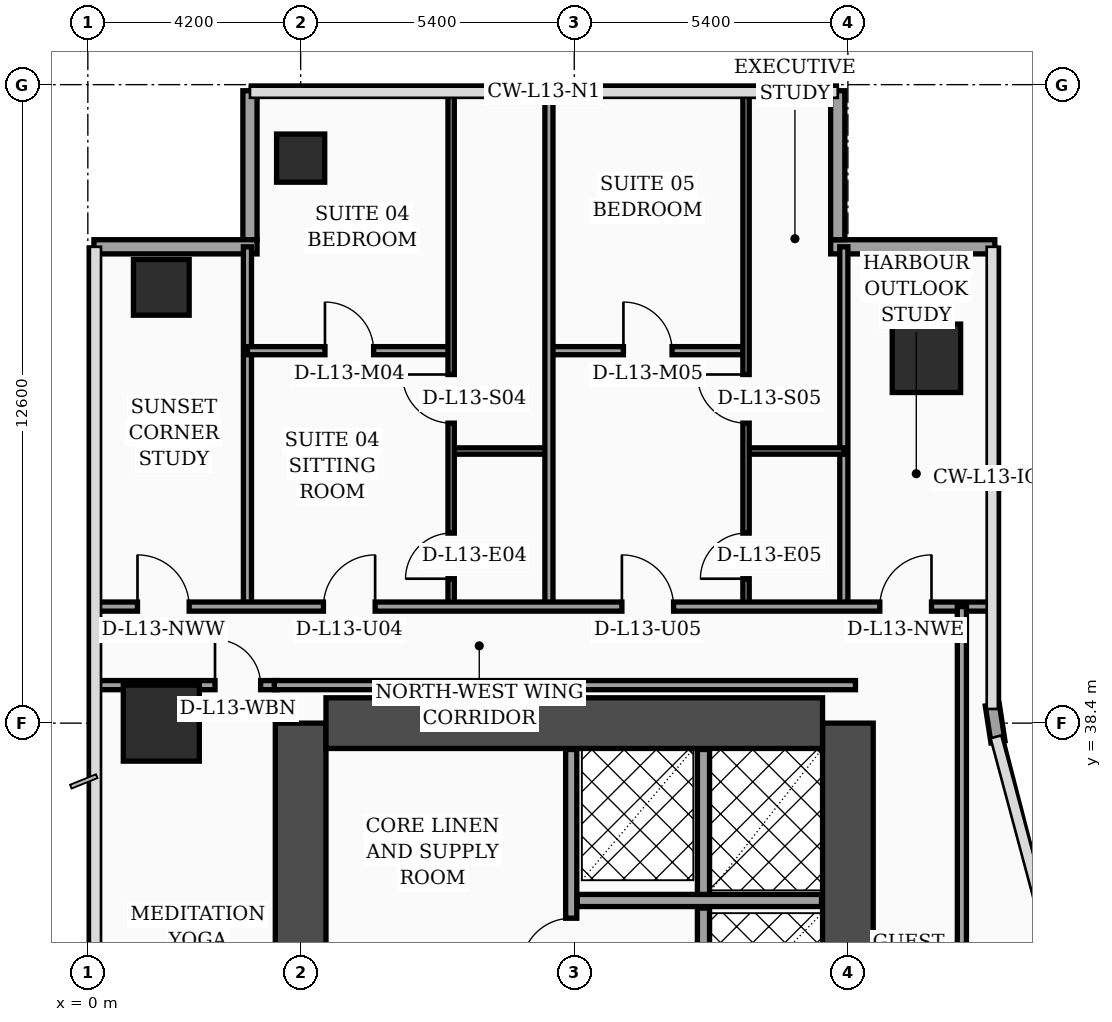
"""IFC4 building model, lengths in metres.
Left out: names, types, materials, properties, quantities, classifications, styles, units other than length and angle.
Written with IfcOpenShell. Run it as: python <this file> out.ifc"""

import sys

from ifc_helpers import new_model, si_unit, direction, frame, frame_2d, origin, origin_2d, place, context, subcontext, project, spatial, rectangle, hollow_rectangle, extrude, element, fill, save


model = new_model("IFC4")
c1 = context("Model", 3, precision=1e-05, world=origin(), true_north=direction((0.0, 1.0)))
c2 = subcontext(c1, "Body", "Model", "MODEL_VIEW")
j1 = project(units=[si_unit("LENGTHUNIT", "METRE"), si_unit("PLANEANGLEUNIT", "RADIAN")], contexts=[c1])
p1 = place(None, origin())
s1 = spatial("IfcSite", under=j1, at=p1, CompositionType="ELEMENT")
p2 = place(p1, origin())
s2 = spatial("IfcBuilding", under=s1, at=p2, CompositionType="ELEMENT")
p3 = place(p2, frame((0.0, 0.0, 58.4)))
s3 = spatial("IfcBuildingStorey", under=s2, at=p3, CompositionType="ELEMENT", Elevation=58.4)
p4 = place(p3, frame((4.2, 16.8, 0.0), z_axis=(0.0, 0.0, 1.0), x_axis=(0.0, 1.0, 0.0)))
e1 = element("IfcWall", 1, at=p4, inside=s3, PredefinedType="SHEAR", context=c2, shape_type="SweptSolid", body=[
    extrude(rectangle(XDim=21.6, YDim=1.0, at=frame_2d((10.8, 0.0))), origin(), (0.0, 0.0, 1.0), 3.56),
])
p5 = place(p3, frame((15.0, 16.8, 0.0), z_axis=(0.0, 0.0, 1.0), x_axis=(0.0, 1.0, 0.0)))
e2 = element("IfcWall", 2, at=p5, inside=s3, PredefinedType="SHEAR", context=c2, shape_type="SweptSolid", body=[
    extrude(rectangle(XDim=21.6, YDim=1.0, at=frame_2d((10.8, 0.0))), origin(), (0.0, 0.0, 1.0), 3.56),
])
p6 = place(p5, frame((8.65, 0.0, 0.0)))
e3 = element("IfcOpeningElement", 3, at=p6, cuts=e2, PredefinedType="OPENING", context=c2, shape_type="SweptSolid", body=[
    extrude(rectangle(XDim=1.1, YDim=2.2, at=frame_2d((0.55, 1.1))), frame((0.0, 0.51, 0.0), z_axis=(0.0, -1.0, 0.0), x_axis=(1.0, 0.0, 0.0)), (0.0, 0.0, 1.0), 1.02),
])
p7 = place(p5, frame((1.25, 0.0, 0.0)))
e4 = element("IfcOpeningElement", 4, at=p7, cuts=e2, PredefinedType="OPENING", context=c2, shape_type="SweptSolid", body=[
    extrude(rectangle(XDim=1.1, YDim=2.2, at=frame_2d((0.55, 1.1))), frame((0.0, 0.51, 0.0), z_axis=(0.0, -1.0, 0.0), x_axis=(1.0, 0.0, 0.0)), (0.0, 0.0, 1.0), 1.02),
])
p8 = place(p5, frame((3.8, 0.0, 0.0)))
e5 = element("IfcOpeningElement", 5, at=p8, cuts=e2, PredefinedType="OPENING", context=c2, shape_type="SweptSolid", body=[
    extrude(rectangle(XDim=1.1, YDim=2.2, at=frame_2d((0.55, 1.1))), frame((0.0, 0.51, 0.0), z_axis=(0.0, -1.0, 0.0), x_axis=(1.0, 0.0, 0.0)), (0.0, 0.0, 1.0), 1.02),
])
p9 = place(p5, frame((6.35, 0.0, 0.0)))
e6 = element("IfcOpeningElement", 6, at=p9, cuts=e2, PredefinedType="OPENING", context=c2, shape_type="SweptSolid", body=[
    extrude(rectangle(XDim=1.1, YDim=2.2, at=frame_2d((0.55, 1.1))), frame((0.0, 0.51, 0.0), z_axis=(0.0, -1.0, 0.0), x_axis=(1.0, 0.0, 0.0)), (0.0, 0.0, 1.0), 1.02),
])
p10 = place(p3, frame((4.7, 38.4, 0.0), z_axis=(0.0, 0.0, 1.0), x_axis=(1.0, 0.0, 0.0)))
e7 = element("IfcWall", 7, at=p10, inside=s3, PredefinedType="SHEAR", context=c2, shape_type="SweptSolid", body=[
    extrude(rectangle(XDim=9.8, YDim=1.0, at=frame_2d((4.9, 0.0))), origin(), (0.0, 0.0, 1.0), 3.56),
])
p11 = place(p3, frame((1.45, 38.4, 0.0), z_axis=(0.0, 0.0, 1.0), x_axis=(1.0, 0.0, 0.0)))
e8 = element("IfcColumn", 8, at=p11, inside=s3, PredefinedType="COLUMN", context=c2, shape_type="SweptSolid", body=[
    extrude(rectangle(XDim=1.5, YDim=1.5, at=origin_2d()), origin(), (0.0, 0.0, 1.0), 3.56),
])
p12 = place(p3, frame((1.45, 47.0, 0.0), z_axis=(0.0, 0.0, 1.0), x_axis=(1.0, 0.0, 0.0)))
e9 = element("IfcColumn", 9, at=p12, inside=s3, PredefinedType="COLUMN", context=c2, shape_type="SweptSolid", body=[
    extrude(hollow_rectangle(XDim=1.1, YDim=1.1, WallThickness=0.045, at=origin_2d()), origin(), (0.0, 0.0, 1.0), 3.56),
])
p13 = place(p3, frame((4.2, 49.55, 0.0), z_axis=(0.0, 0.0, 1.0), x_axis=(1.0, 0.0, 0.0)))
e10 = element("IfcColumn", 10, at=p13, inside=s3, PredefinedType="COLUMN", context=c2, shape_type="SweptSolid", body=[
    extrude(hollow_rectangle(XDim=0.95, YDim=0.95, WallThickness=0.04, at=origin_2d()), origin(), (0.0, 0.0, 1.0), 3.56),
])
p14 = place(p3, frame((16.55, 45.6, 0.0), z_axis=(0.0, 0.0, 1.0), x_axis=(1.0, 0.0, 0.0)))
e11 = element("IfcColumn", 11, at=p14, inside=s3, PredefinedType="COLUMN", context=c2, shape_type="SweptSolid", body=[
    extrude(rectangle(XDim=1.35, YDim=1.35, at=origin_2d()), origin(), (0.0, 0.0, 1.0), 3.56),
])
p15 = place(p3, frame((17.962, 38.03, 0.0), z_axis=(0.0, 0.0, 1.0), x_axis=(-0.15141125477, 0.988470855377, 0.0)))
e12 = element("IfcWall", 12, at=p15, inside=s3, PredefinedType="SOLIDWALL", context=c2, shape_type="SweptSolid", body=[
    extrude(rectangle(XDim=0.739, YDim=0.28, at=frame_2d((0.369, 0.0))), origin(), (0.0, 0.0, 1.0), 3.56),
])
p16 = place(p3, frame((17.9, 47.8, 0.0), z_axis=(0.0, 0.0, 1.0), x_axis=(-1.0, 0.0, 0.0)))
e13 = element("IfcWall", 13, at=p16, inside=s3, PredefinedType="SOLIDWALL", context=c2, shape_type="SweptSolid", body=[
    extrude(rectangle(XDim=3.24, YDim=0.28, at=frame_2d((1.62, 0.0))), origin(), (0.0, 0.0, 1.0), 3.56),
])
p17 = place(p3, frame((14.8, 47.94, 0.0), z_axis=(0.0, 0.0, 1.0), x_axis=(0.0, 1.0, 0.0)))
e14 = element("IfcWall", 14, at=p17, inside=s3, PredefinedType="SOLIDWALL", context=c2, shape_type="SweptSolid", body=[
    extrude(rectangle(XDim=2.94, YDim=0.28, at=frame_2d((1.47, 0.0))), origin(), (0.0, 0.0, 1.0), 3.56),
])
p18 = place(p3, frame((3.2, 50.88, 0.0), z_axis=(0.0, 0.0, 1.0), x_axis=(0.0, -1.0, 0.0)))
e15 = element("IfcWall", 15, at=p18, inside=s3, PredefinedType="SOLIDWALL", context=c2, shape_type="SweptSolid", body=[
    extrude(rectangle(XDim=2.94, YDim=0.28, at=frame_2d((1.47, 0.0))), origin(), (0.0, 0.0, 1.0), 3.04),
])
p19 = place(p3, frame((3.34, 47.8, 0.0), z_axis=(0.0, 0.0, 1.0), x_axis=(-1.0, 0.0, 0.0)))
e16 = element("IfcWall", 16, at=p19, inside=s3, PredefinedType="SOLIDWALL", context=c2, shape_type="SweptSolid", body=[
    extrude(rectangle(XDim=3.22, YDim=0.28, at=frame_2d((1.61, 0.0))), origin(), (0.0, 0.0, 1.0), 3.04),
])
p20 = place(p3, frame((9.54, 32.92, 0.0), z_axis=(0.0, 0.0, 1.0), x_axis=(0.0, 1.0, 0.0)))
e17 = element("IfcWall", 17, at=p20, inside=s3, PredefinedType="SOLIDWALL", context=c2, shape_type="SweptSolid", body=[
    extrude(rectangle(XDim=4.96, YDim=0.22, at=frame_2d((2.48, 0.0))), origin(), (0.0, 0.0, 1.0), 3.56),
])
p21 = place(p20, frame((0.65, 0.0, 0.0)))
e18 = element("IfcOpeningElement", 18, at=p21, cuts=e17, PredefinedType="OPENING", context=c2, shape_type="SweptSolid", body=[
    extrude(rectangle(XDim=0.98, YDim=2.15, at=frame_2d((0.49, 1.075))), frame((0.0, 0.12, 0.0), z_axis=(0.0, -1.0, 0.0), x_axis=(1.0, 0.0, 0.0)), (0.0, 0.0, 1.0), 0.24),
])
p22 = place(p3, frame((12.15, 27.0, 0.0), z_axis=(0.0, 0.0, 1.0), x_axis=(0.0, 1.0, 0.0)))
e19 = element("IfcWall", 19, at=p22, inside=s3, PredefinedType="SOLIDWALL", context=c2, shape_type="SweptSolid", body=[
    extrude(rectangle(XDim=7.75, YDim=0.24, at=frame_2d((3.875, 0.0))), origin(), (0.0, 0.0, 1.0), 3.56),
])
p23 = place(p3, frame((9.66, 34.9, 0.0), z_axis=(0.0, 0.0, 1.0), x_axis=(1.0, 0.0, 0.0)))
e20 = element("IfcWall", 20, at=p23, inside=s3, PredefinedType="SOLIDWALL", context=c2, shape_type="SweptSolid", body=[
    extrude(rectangle(XDim=4.82, YDim=0.24, at=frame_2d((2.41, 0.0))), origin(), (0.0, 0.0, 1.0), 3.56),
])
p24 = place(p3, frame((12.15, 35.02, 0.0), z_axis=(0.0, 0.0, 1.0), x_axis=(0.0, 1.0, 0.0)))
e21 = element("IfcWall", 21, at=p24, inside=s3, PredefinedType="SOLIDWALL", context=c2, shape_type="SweptSolid", body=[
    extrude(rectangle(XDim=2.86, YDim=0.24, at=frame_2d((1.43, 0.0))), origin(), (0.0, 0.0, 1.0), 3.56),
])
p25 = place(p3, frame((0.08, 39.15, 0.0), z_axis=(0.0, 0.0, 1.0), x_axis=(1.0, 0.0, 0.0)))
e22 = element("IfcWall", 22, at=p25, inside=s3, PredefinedType="PARTITIONING", context=c2, shape_type="SweptSolid", body=[
    extrude(rectangle(XDim=3.65, YDim=0.18, at=frame_2d((1.825, 0.0))), origin(), (0.0, 0.0, 1.0), 2.84),
])
p26 = place(p25, frame((2.43, 0.0, 0.0)))
e23 = element("IfcOpeningElement", 23, at=p26, cuts=e22, PredefinedType="OPENING", context=c2, shape_type="SweptSolid", body=[
    extrude(rectangle(XDim=0.9, YDim=2.15, at=frame_2d((0.45, 1.075))), frame((0.0, 0.1, 0.0), z_axis=(0.0, -1.0, 0.0), x_axis=(1.0, 0.0, 0.0)), (0.0, 0.0, 1.0), 0.2),
])
p27 = place(p3, frame((3.15, 40.7, 0.0), z_axis=(0.0, 0.0, 1.0), x_axis=(0.0, 1.0, 0.0)))
e24 = element("IfcWall", 24, at=p27, inside=s3, PredefinedType="PARTITIONING", context=c2, shape_type="SweptSolid", body=[
    extrude(rectangle(XDim=7.1, YDim=0.16, at=frame_2d((3.55, 0.0))), origin(), (0.0, 0.0, 1.0), 3.14),
])
p28 = place(p3, frame((14.92, 40.7, 0.0), z_axis=(0.0, 0.0, 1.0), x_axis=(0.0, 1.0, 0.0)))
e25 = element("IfcWall", 25, at=p28, inside=s3, PredefinedType="PARTITIONING", context=c2, shape_type="SweptSolid", body=[
    extrude(rectangle(XDim=7.1, YDim=0.16, at=frame_2d((3.55, 0.0))), origin(), (0.0, 0.0, 1.0), 3.04),
])
p29 = place(p3, frame((7.17, 43.77, 0.0), z_axis=(0.0, 0.0, 1.0), x_axis=(1.0, 0.0, 0.0)))
e26 = element("IfcWall", 26, at=p29, inside=s3, PredefinedType="PARTITIONING", context=c2, shape_type="SweptSolid", body=[
    extrude(rectangle(XDim=1.93, YDim=0.125, at=frame_2d((0.965, 0.0))), origin(), (0.0, 0.0, 1.0), 3.56),
])
p30 = place(p3, frame((3.15, 45.75, 0.0), z_axis=(0.0, 0.0, 1.0), x_axis=(1.0, 0.0, 0.0)))
e27 = element("IfcWall", 27, at=p30, inside=s3, PredefinedType="PARTITIONING", context=c2, shape_type="SweptSolid", body=[
    extrude(rectangle(XDim=4.02, YDim=0.16, at=frame_2d((2.01, 0.0))), origin(), (0.0, 0.0, 1.0), 2.84),
])
p31 = place(p30, frame((1.53, 0.0, 0.0)))
e28 = element("IfcOpeningElement", 28, at=p31, cuts=e27, PredefinedType="OPENING", context=c2, shape_type="SweptSolid", body=[
    extrude(rectangle(XDim=0.96, YDim=2.2, at=frame_2d((0.48, 1.1))), frame((0.0, 0.09, 0.0), z_axis=(0.0, -1.0, 0.0), x_axis=(1.0, 0.0, 0.0)), (0.0, 0.0, 1.0), 0.18),
])
p32 = place(p3, frame((7.17, 40.7, 0.0), z_axis=(0.0, 0.0, 1.0), x_axis=(0.0, 1.0, 0.0)))
e29 = element("IfcWall", 29, at=p32, inside=s3, PredefinedType="PARTITIONING", context=c2, shape_type="SweptSolid", body=[
    extrude(rectangle(XDim=10.24, YDim=0.125, at=frame_2d((5.12, 0.0))), origin(), (0.0, 0.0, 1.0), 3.04),
])
p33 = place(p32, frame((0.55, 0.0, 0.0)))
e30 = element("IfcOpeningElement", 30, at=p33, cuts=e29, PredefinedType="OPENING", context=c2, shape_type="SweptSolid", body=[
    extrude(rectangle(XDim=0.9, YDim=2.15, at=frame_2d((0.45, 1.075))), frame((0.0, 0.073, 0.0), z_axis=(0.0, -1.0, 0.0), x_axis=(1.0, 0.0, 0.0)), (0.0, 0.0, 1.0), 0.145),
])
p34 = place(p32, frame((3.62, 0.0, 0.0)))
e31 = element("IfcOpeningElement", 31, at=p34, cuts=e29, PredefinedType="OPENING", context=c2, shape_type="SweptSolid", body=[
    extrude(rectangle(XDim=0.96, YDim=2.2, at=frame_2d((0.48, 1.1))), frame((0.0, 0.073, 0.0), z_axis=(0.0, -1.0, 0.0), x_axis=(1.0, 0.0, 0.0)), (0.0, 0.0, 1.0), 0.145),
])
p35 = place(p3, frame((12.99, 43.77, 0.0), z_axis=(0.0, 0.0, 1.0), x_axis=(1.0, 0.0, 0.0)))
e32 = element("IfcWall", 32, at=p35, inside=s3, PredefinedType="PARTITIONING", context=c2, shape_type="SweptSolid", body=[
    extrude(rectangle(XDim=1.93, YDim=0.125, at=frame_2d((0.965, 0.0))), origin(), (0.0, 0.0, 1.0), 3.56),
])
p36 = place(p3, frame((9.1, 45.75, 0.0), z_axis=(0.0, 0.0, 1.0), x_axis=(1.0, 0.0, 0.0)))
e33 = element("IfcWall", 33, at=p36, inside=s3, PredefinedType="PARTITIONING", context=c2, shape_type="SweptSolid", body=[
    extrude(rectangle(XDim=3.89, YDim=0.16, at=frame_2d((1.945, 0.0))), origin(), (0.0, 0.0, 1.0), 3.56),
])
p37 = place(p36, frame((1.47, 0.0, 0.0)))
e34 = element("IfcOpeningElement", 34, at=p37, cuts=e33, PredefinedType="OPENING", context=c2, shape_type="SweptSolid", body=[
    extrude(rectangle(XDim=0.96, YDim=2.2, at=frame_2d((0.48, 1.1))), frame((0.0, 0.09, 0.0), z_axis=(0.0, -1.0, 0.0), x_axis=(1.0, 0.0, 0.0)), (0.0, 0.0, 1.0), 0.18),
])
p38 = place(p3, frame((12.99, 40.7, 0.0), z_axis=(0.0, 0.0, 1.0), x_axis=(0.0, 1.0, 0.0)))
e35 = element("IfcWall", 35, at=p38, inside=s3, PredefinedType="PARTITIONING", context=c2, shape_type="SweptSolid", body=[
    extrude(rectangle(XDim=10.24, YDim=0.125, at=frame_2d((5.12, 0.0))), origin(), (0.0, 0.0, 1.0), 3.04),
])
p39 = place(p38, frame((0.55, 0.0, 0.0)))
e36 = element("IfcOpeningElement", 36, at=p39, cuts=e35, PredefinedType="OPENING", context=c2, shape_type="SweptSolid", body=[
    extrude(rectangle(XDim=0.9, YDim=2.15, at=frame_2d((0.45, 1.075))), frame((0.0, 0.073, 0.0), z_axis=(0.0, -1.0, 0.0), x_axis=(1.0, 0.0, 0.0)), (0.0, 0.0, 1.0), 0.145),
])
p40 = place(p38, frame((3.62, 0.0, 0.0)))
e37 = element("IfcOpeningElement", 37, at=p40, cuts=e35, PredefinedType="OPENING", context=c2, shape_type="SweptSolid", body=[
    extrude(rectangle(XDim=0.96, YDim=2.2, at=frame_2d((0.48, 1.1))), frame((0.0, 0.073, 0.0), z_axis=(0.0, -1.0, 0.0), x_axis=(1.0, 0.0, 0.0)), (0.0, 0.0, 1.0), 0.145),
])
p41 = place(p3, frame((9.1, 40.7, 0.0), z_axis=(0.0, 0.0, 1.0), x_axis=(0.0, 1.0, 0.0)))
e38 = element("IfcWall", 38, at=p41, inside=s3, PredefinedType="PARTITIONING", context=c2, shape_type="SweptSolid", body=[
    extrude(rectangle(XDim=10.24, YDim=0.16, at=frame_2d((5.12, 0.0))), origin(), (0.0, 0.0, 1.0), 3.04),
])
p42 = place(p3, frame((0.08, 40.7, 0.0), z_axis=(0.0, 0.0, 1.0), x_axis=(1.0, 0.0, 0.0)))
e39 = element("IfcWall", 39, at=p42, inside=s3, PredefinedType="PARTITIONING", context=c2, shape_type="SweptSolid", body=[
    extrude(rectangle(XDim=17.77, YDim=0.18, at=frame_2d((8.885, 0.0))), origin(), (0.0, 0.0, 1.0), 2.84),
])
p43 = place(p42, frame((0.9, 0.0, 0.0)))
e40 = element("IfcOpeningElement", 40, at=p43, cuts=e39, PredefinedType="OPENING", context=c2, shape_type="SweptSolid", body=[
    extrude(rectangle(XDim=1.02, YDim=2.2, at=frame_2d((0.51, 1.1))), frame((0.0, 0.1, 0.0), z_axis=(0.0, -1.0, 0.0), x_axis=(1.0, 0.0, 0.0)), (0.0, 0.0, 1.0), 0.2),
])
p44 = place(p42, frame((4.57, 0.0, 0.0)))
e41 = element("IfcOpeningElement", 41, at=p44, cuts=e39, PredefinedType="OPENING", context=c2, shape_type="SweptSolid", body=[
    extrude(rectangle(XDim=1.02, YDim=2.2, at=frame_2d((0.51, 1.1))), frame((0.0, 0.1, 0.0), z_axis=(0.0, -1.0, 0.0), x_axis=(1.0, 0.0, 0.0)), (0.0, 0.0, 1.0), 0.2),
])
p45 = place(p42, frame((10.46, 0.0, 0.0)))
e42 = element("IfcOpeningElement", 42, at=p45, cuts=e39, PredefinedType="OPENING", context=c2, shape_type="SweptSolid", body=[
    extrude(rectangle(XDim=1.02, YDim=2.2, at=frame_2d((0.51, 1.1))), frame((0.0, 0.1, 0.0), z_axis=(0.0, -1.0, 0.0), x_axis=(1.0, 0.0, 0.0)), (0.0, 0.0, 1.0), 0.2),
])
p46 = place(p42, frame((15.55, 0.0, 0.0)))
e43 = element("IfcOpeningElement", 43, at=p46, cuts=e39, PredefinedType="OPENING", context=c2, shape_type="SweptSolid", body=[
    extrude(rectangle(XDim=1.02, YDim=2.2, at=frame_2d((0.51, 1.1))), frame((0.0, 0.1, 0.0), z_axis=(0.0, -1.0, 0.0), x_axis=(1.0, 0.0, 0.0)), (0.0, 0.0, 1.0), 0.2),
])
p47 = place(p3, frame((17.25, 24.3, 0.0), z_axis=(0.0, 0.0, 1.0), x_axis=(0.0, 1.0, 0.0)))
e44 = element("IfcWall", 44, at=p47, inside=s3, PredefinedType="PARTITIONING", context=c2, shape_type="SweptSolid", body=[
    extrude(rectangle(XDim=16.4, YDim=0.18, at=frame_2d((8.2, 0.0))), origin(), (0.0, 0.0, 1.0), 2.84),
])
p48 = place(p3, frame((3.68, 39.15, 0.0), z_axis=(0.0, 0.0, 1.0), x_axis=(1.0, 0.0, 0.0)))
e45 = element("IfcWall", 45, at=p48, inside=s3, PredefinedType="PARTITIONING", context=c2, shape_type="SweptSolid", body=[
    extrude(rectangle(XDim=11.47, YDim=0.18, at=frame_2d((5.735, 0.0))), origin(), (0.0, 0.0, 1.0), 2.84),
])
p49 = place(p21, origin())
e46 = element("IfcDoor", 46, at=p49, inside=s3, OperationType="SINGLE_SWING_LEFT", PredefinedType="DOOR", context=c2, shape_type="SweptSolid", body=[
    extrude(rectangle(XDim=0.98, YDim=2.15, at=frame_2d((0.49, 1.075))), frame((0.0, 0.025, 0.0), z_axis=(0.0, -1.0, 0.0), x_axis=(1.0, 0.0, 0.0)), (0.0, 0.0, 1.0), 0.05),
])
fill(e18, e46)
p50 = place(p26, origin())
e47 = element("IfcDoor", 47, at=p50, inside=s3, OperationType="SINGLE_SWING_LEFT", PredefinedType="DOOR", context=c2, shape_type="SweptSolid", body=[
    extrude(rectangle(XDim=0.9, YDim=2.15, at=frame_2d((0.45, 1.075))), frame((0.0, 0.025, 0.0), z_axis=(0.0, -1.0, 0.0), x_axis=(1.0, 0.0, 0.0)), (0.0, 0.0, 1.0), 0.05),
])
fill(e23, e47)
p51 = place(p31, origin())
e48 = element("IfcDoor", 48, at=p51, inside=s3, OperationType="SINGLE_SWING_LEFT", PredefinedType="DOOR", context=c2, shape_type="SweptSolid", body=[
    extrude(rectangle(XDim=0.96, YDim=2.2, at=frame_2d((0.48, 1.1))), frame((0.0, 0.025, 0.0), z_axis=(0.0, -1.0, 0.0), x_axis=(1.0, 0.0, 0.0)), (0.0, 0.0, 1.0), 0.05),
])
fill(e28, e48)
p52 = place(p33, origin())
e49 = element("IfcDoor", 49, at=p52, inside=s3, OperationType="SINGLE_SWING_LEFT", PredefinedType="DOOR", context=c2, shape_type="SweptSolid", body=[
    extrude(rectangle(XDim=0.9, YDim=2.15, at=frame_2d((0.45, 1.075))), frame((0.0, 0.025, 0.0), z_axis=(0.0, -1.0, 0.0), x_axis=(1.0, 0.0, 0.0)), (0.0, 0.0, 1.0), 0.05),
])
fill(e30, e49)
p53 = place(p34, origin())
e50 = element("IfcDoor", 50, at=p53, inside=s3, OperationType="SINGLE_SWING_RIGHT", PredefinedType="DOOR", context=c2, shape_type="SweptSolid", body=[
    extrude(rectangle(XDim=0.96, YDim=2.2, at=frame_2d((0.48, 1.1))), frame((0.0, 0.025, 0.0), z_axis=(0.0, -1.0, 0.0), x_axis=(1.0, 0.0, 0.0)), (0.0, 0.0, 1.0), 0.05),
])
fill(e31, e50)
p54 = place(p37, origin())
e51 = element("IfcDoor", 51, at=p54, inside=s3, OperationType="SINGLE_SWING_LEFT", PredefinedType="DOOR", context=c2, shape_type="SweptSolid", body=[
    extrude(rectangle(XDim=0.96, YDim=2.2, at=frame_2d((0.48, 1.1))), frame((0.0, 0.025, 0.0), z_axis=(0.0, -1.0, 0.0), x_axis=(1.0, 0.0, 0.0)), (0.0, 0.0, 1.0), 0.05),
])
fill(e34, e51)
p55 = place(p39, origin())
e52 = element("IfcDoor", 52, at=p55, inside=s3, OperationType="SINGLE_SWING_LEFT", PredefinedType="DOOR", context=c2, shape_type="SweptSolid", body=[
    extrude(rectangle(XDim=0.9, YDim=2.15, at=frame_2d((0.45, 1.075))), frame((0.0, 0.025, 0.0), z_axis=(0.0, -1.0, 0.0), x_axis=(1.0, 0.0, 0.0)), (0.0, 0.0, 1.0), 0.05),
])
fill(e36, e52)
p56 = place(p40, origin())
e53 = element("IfcDoor", 53, at=p56, inside=s3, OperationType="SINGLE_SWING_RIGHT", PredefinedType="DOOR", context=c2, shape_type="SweptSolid", body=[
    extrude(rectangle(XDim=0.96, YDim=2.2, at=frame_2d((0.48, 1.1))), frame((0.0, 0.025, 0.0), z_axis=(0.0, -1.0, 0.0), x_axis=(1.0, 0.0, 0.0)), (0.0, 0.0, 1.0), 0.05),
])
fill(e37, e53)
p57 = place(p43, origin())
e54 = element("IfcDoor", 54, at=p57, inside=s3, OperationType="SINGLE_SWING_LEFT", PredefinedType="DOOR", context=c2, shape_type="SweptSolid", body=[
    extrude(rectangle(XDim=1.02, YDim=2.2, at=frame_2d((0.51, 1.1))), frame((0.0, 0.025, 0.0), z_axis=(0.0, -1.0, 0.0), x_axis=(1.0, 0.0, 0.0)), (0.0, 0.0, 1.0), 0.05),
])
fill(e40, e54)
p58 = place(p44, origin())
e55 = element("IfcDoor", 55, at=p58, inside=s3, OperationType="SINGLE_SWING_RIGHT", PredefinedType="DOOR", context=c2, shape_type="SweptSolid", body=[
    extrude(rectangle(XDim=1.02, YDim=2.2, at=frame_2d((0.51, 1.1))), frame((0.0, 0.025, 0.0), z_axis=(0.0, -1.0, 0.0), x_axis=(1.0, 0.0, 0.0)), (0.0, 0.0, 1.0), 0.05),
])
fill(e41, e55)
p59 = place(p45, origin())
e56 = element("IfcDoor", 56, at=p59, inside=s3, OperationType="SINGLE_SWING_LEFT", PredefinedType="DOOR", context=c2, shape_type="SweptSolid", body=[
    extrude(rectangle(XDim=1.02, YDim=2.2, at=frame_2d((0.51, 1.1))), frame((0.0, 0.025, 0.0), z_axis=(0.0, -1.0, 0.0), x_axis=(1.0, 0.0, 0.0)), (0.0, 0.0, 1.0), 0.05),
])
fill(e42, e56)
p60 = place(p46, origin())
e57 = element("IfcDoor", 57, at=p60, inside=s3, OperationType="SINGLE_SWING_RIGHT", PredefinedType="DOOR", context=c2, shape_type="SweptSolid", body=[
    extrude(rectangle(XDim=1.02, YDim=2.2, at=frame_2d((0.51, 1.1))), frame((0.0, 0.025, 0.0), z_axis=(0.0, -1.0, 0.0), x_axis=(1.0, 0.0, 0.0)), (0.0, 0.0, 1.0), 0.05),
])
fill(e43, e57)
save(model, sys.argv[1])
